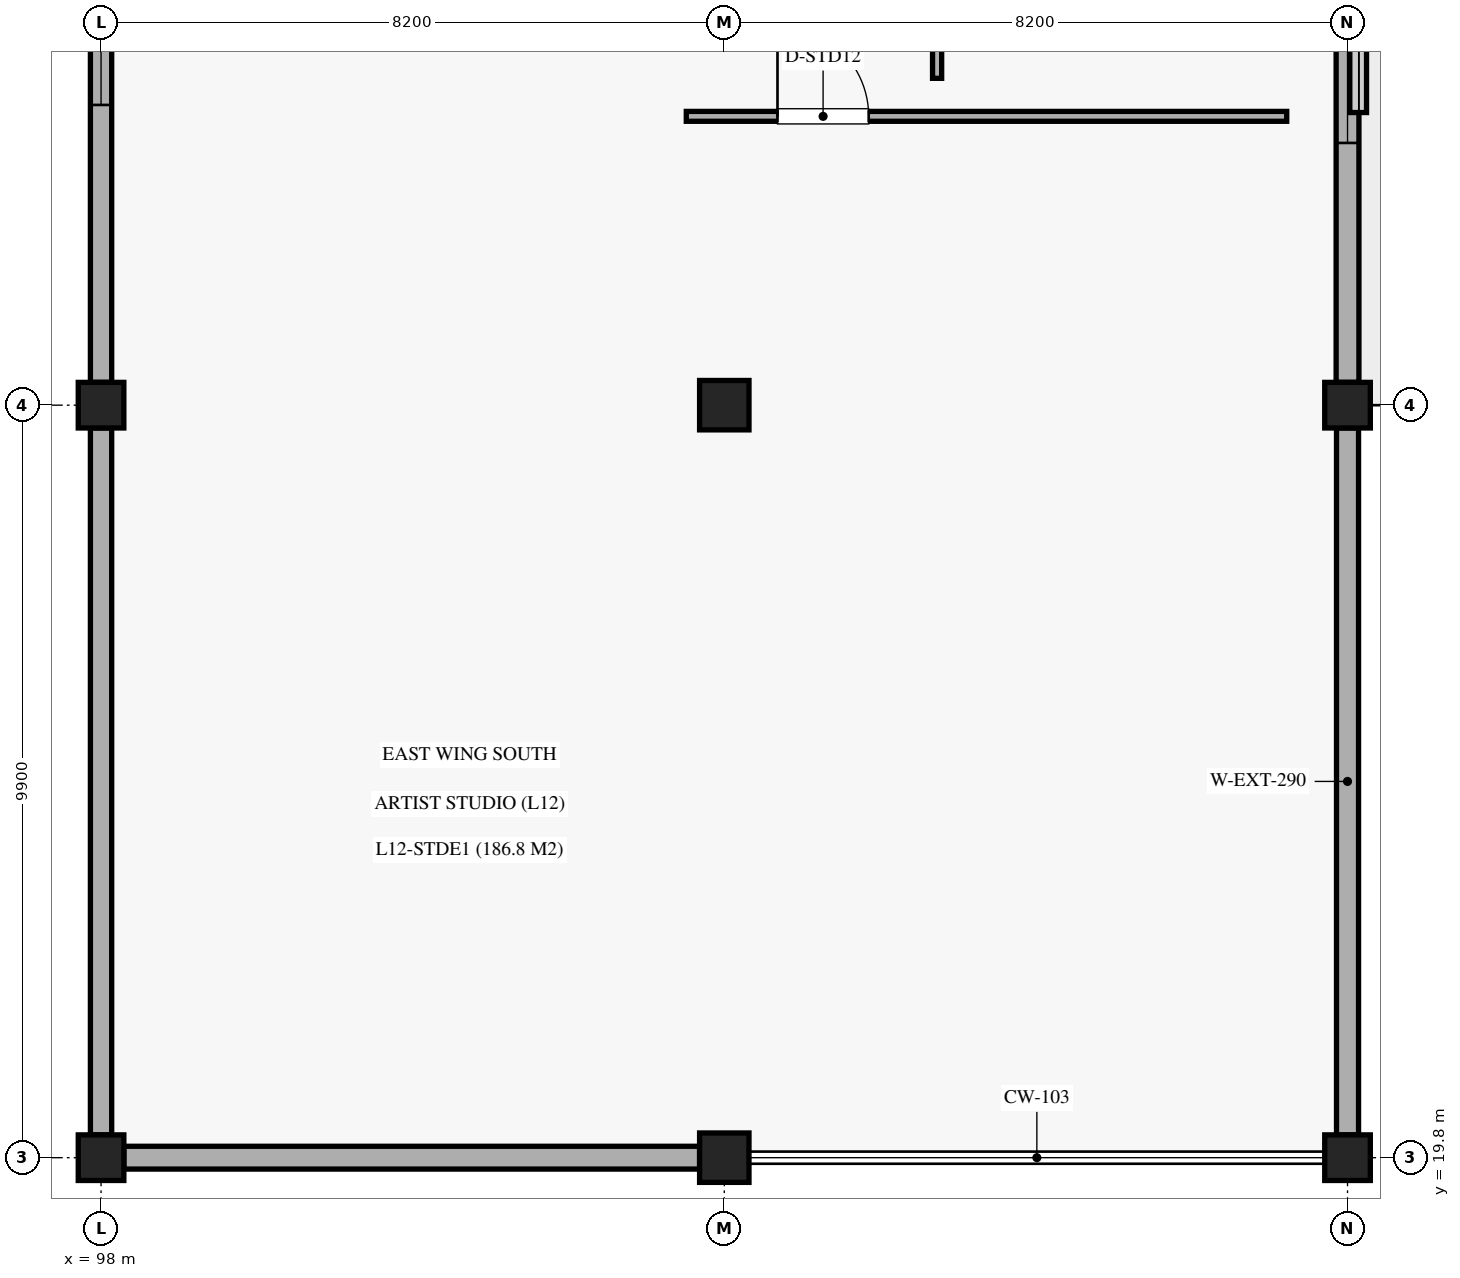
"""IFC4 building model, lengths in metres.
Left out: names, types, materials, properties, quantities, classifications, styles, units other than length and angle.
Written with IfcOpenShell. Run it as: python <this file> out.ifc"""

import sys

from ifc_helpers import new_model, si_unit, direction, frame, frame_2d, origin, origin_2d, place, context, subcontext, project, spatial, rectangle, extrude, element, fill, save


model = new_model("IFC4")
c1 = context("Model", 3, precision=1e-05, world=origin(), true_north=direction((0.0, 1.0)))
c2 = subcontext(c1, "Body", "Model", "MODEL_VIEW")
j1 = project(units=[si_unit("LENGTHUNIT", "METRE"), si_unit("PLANEANGLEUNIT", "RADIAN")], contexts=[c1])
p1 = place(None, origin())
s1 = spatial("IfcSite", under=j1, at=p1, CompositionType="ELEMENT")
p2 = place(p1, origin())
s2 = spatial("IfcBuilding", under=s1, at=p2, CompositionType="ELEMENT")
p3 = place(p2, frame((0.0, 0.0, 62.22)))
s3 = spatial("IfcBuildingStorey", under=s2, at=p3, CompositionType="ELEMENT", Elevation=62.22)
for number, where, z_axis, x_axis in (
    (1, (98.0, 19.8, 0.0), (0.0, 0.0, 1.0), (1.0, 0.0, 0.0)),
    (2, (98.0, 29.7, 0.0), (0.0, 0.0, 1.0), (1.0, 0.0, 0.0)),
):
    element("IfcColumn", number, at=place(p3, frame(where, z_axis=z_axis, x_axis=x_axis)), inside=s3, PredefinedType="COLUMN", context=c2, shape_type="SweptSolid", body=[
        extrude(rectangle(XDim=0.6, YDim=0.6, at=origin_2d()), origin(), (0.0, 0.0, 1.0), 4.08),
    ])
for number, where, z_axis, x_axis in (
    (3, (106.2, 19.8, 0.0), (0.0, 0.0, 1.0), (1.0, 0.0, 0.0)),
    (4, (106.2, 29.7, 0.0), (0.0, 0.0, 1.0), (1.0, 0.0, 0.0)),
):
    element("IfcColumn", number, at=place(p3, frame(where, z_axis=z_axis, x_axis=x_axis)), inside=s3, PredefinedType="COLUMN", context=c2, shape_type="SweptSolid", body=[
        extrude(rectangle(XDim=0.65, YDim=0.65, at=origin_2d()), origin(), (0.0, 0.0, 1.0), 4.08),
    ])
for number, where, z_axis, x_axis in (
    (5, (114.4, 19.8, 0.0), (0.0, 0.0, 1.0), (1.0, 0.0, 0.0)),
    (6, (114.4, 29.7, 0.0), (0.0, 0.0, 1.0), (1.0, 0.0, 0.0)),
):
    element("IfcColumn", number, at=place(p3, frame(where, z_axis=z_axis, x_axis=x_axis)), inside=s3, PredefinedType="COLUMN", context=c2, shape_type="SweptSolid", body=[
        extrude(rectangle(XDim=0.6, YDim=0.6, at=origin_2d()), origin(), (0.0, 0.0, 1.0), 4.08),
    ])
p4 = place(p3, frame((98.0, 20.1, 0.0), z_axis=(0.0, 0.0, 1.0), x_axis=(0.0, 1.0, 0.0)))
e7 = element("IfcWall", 7, at=p4, inside=s3, PredefinedType="SOLIDWALL", context=c2, shape_type="SweptSolid", body=[
    extrude(rectangle(XDim=9.3, YDim=0.28, at=frame_2d((4.65, 0.0))), origin(), (0.0, 0.0, 1.0), 3.1),
])
p5 = place(p3, frame((114.4, 20.1, 0.0), z_axis=(0.0, 0.0, 1.0), x_axis=(0.0, 1.0, 0.0)))
e8 = element("IfcWall", 8, at=p5, inside=s3, PredefinedType="SOLIDWALL", context=c2, shape_type="SweptSolid", body=[
    extrude(rectangle(XDim=9.3, YDim=0.29, at=frame_2d((4.65, 0.0))), origin(), (0.0, 0.0, 1.0), 3.1),
])
p6 = place(p3, frame((98.0, 30.0, 0.0), z_axis=(0.0, 0.0, 1.0), x_axis=(0.0, 1.0, 0.0)))
e9 = element("IfcWall", 9, at=p6, inside=s3, PredefinedType="SOLIDWALL", context=c2, shape_type="SweptSolid", body=[
    extrude(rectangle(XDim=9.3, YDim=0.28, at=frame_2d((4.65, 0.0))), origin(), (0.0, 0.0, 1.0), 3.1),
])
p7 = place(p6, frame((3.65, 0.0, 1.15)))
e10 = element("IfcOpeningElement", 10, at=p7, cuts=e9, PredefinedType="OPENING", context=c2, shape_type="SweptSolid", body=[
    extrude(rectangle(XDim=2.1, YDim=1.5, at=frame_2d((1.05, 0.75))), frame((0.0, 0.15, 0.0), z_axis=(0.0, -1.0, 0.0), x_axis=(1.0, 0.0, 0.0)), (0.0, 0.0, 1.0), 0.3),
])
p8 = place(p3, frame((114.4, 30.0, 0.0), z_axis=(0.0, 0.0, 1.0), x_axis=(0.0, 1.0, 0.0)))
e11 = element("IfcWall", 11, at=p8, inside=s3, PredefinedType="SOLIDWALL", context=c2, shape_type="SweptSolid", body=[
    extrude(rectangle(XDim=9.3, YDim=0.3, at=frame_2d((4.65, 0.0))), origin(), (0.0, 0.0, 1.0), 3.1),
])
p9 = place(p8, frame((3.15, 0.0, 1.15)))
e12 = element("IfcOpeningElement", 12, at=p9, cuts=e11, PredefinedType="OPENING", context=c2, shape_type="SweptSolid", body=[
    extrude(rectangle(XDim=3.0, YDim=1.95, at=frame_2d((1.5, 0.975))), frame((0.0, 0.16, 0.0), z_axis=(0.0, -1.0, 0.0), x_axis=(1.0, 0.0, 0.0)), (0.0, 0.0, 1.0), 0.32),
])
p10 = place(p3, frame((98.3, 19.8, 0.0), z_axis=(0.0, 0.0, 1.0), x_axis=(1.0, 0.0, 0.0)))
e13 = element("IfcWall", 13, at=p10, inside=s3, PredefinedType="SOLIDWALL", context=c2, shape_type="SweptSolid", body=[
    extrude(rectangle(XDim=7.575, YDim=0.3, at=frame_2d((3.788, 0.0))), origin(), (0.0, 0.0, 1.0), 3.1),
])
p11 = place(p3, frame((105.7, 33.5, 0.0), z_axis=(0.0, 0.0, 1.0), x_axis=(1.0, 0.0, 0.0)))
e14 = element("IfcWall", 14, at=p11, inside=s3, PredefinedType="PARTITIONING", context=c2, shape_type="SweptSolid", body=[
    extrude(rectangle(XDim=7.9, YDim=0.13, at=frame_2d((3.95, 0.0))), origin(), (0.0, 0.0, 1.0), 2.97),
])
p12 = place(p11, frame((1.2, 0.0, 0.0)))
e15 = element("IfcOpeningElement", 15, at=p12, cuts=e14, PredefinedType="OPENING", context=c2, shape_type="SweptSolid", body=[
    extrude(rectangle(XDim=1.2, YDim=2.25, at=frame_2d((0.6, 1.125))), frame((0.0, 0.075, 0.0), z_axis=(0.0, -1.0, 0.0), x_axis=(1.0, 0.0, 0.0)), (0.0, 0.0, 1.0), 0.15),
])
p13 = place(p3, frame((109.0, 34.0, 0.0), z_axis=(0.0, 0.0, 1.0), x_axis=(0.0, 1.0, 0.0)))
e16 = element("IfcWall", 16, at=p13, inside=s3, PredefinedType="PARTITIONING", context=c2, shape_type="SweptSolid", body=[
    extrude(rectangle(XDim=30.0, YDim=0.12, at=frame_2d((15.0, 0.0))), origin(), (0.0, 0.0, 1.0), 2.97),
])
p14 = place(p13, frame((8.0, 0.0, 0.0)))
e17 = element("IfcOpeningElement", 17, at=p14, cuts=e16, PredefinedType="OPENING", context=c2, shape_type="SweptSolid", body=[
    extrude(rectangle(XDim=1.2, YDim=2.25, at=frame_2d((0.6, 1.125))), frame((0.0, 0.07, 0.0), z_axis=(0.0, -1.0, 0.0), x_axis=(1.0, 0.0, 0.0)), (0.0, 0.0, 1.0), 0.14),
])
p15 = place(p7, origin())
e18 = element("IfcWindow", 18, at=p15, inside=s3, PartitioningType="SINGLE_PANEL", PredefinedType="WINDOW", context=c2, shape_type="SweptSolid", body=[
    extrude(rectangle(XDim=2.1, YDim=1.5, at=frame_2d((1.05, 0.75))), frame((0.0, 0.03, 0.0), z_axis=(0.0, -1.0, 0.0), x_axis=(1.0, 0.0, 0.0)), (0.0, 0.0, 1.0), 0.06),
])
fill(e10, e18)
p16 = place(p9, origin())
e19 = element("IfcWindow", 19, at=p16, inside=s3, PartitioningType="SINGLE_PANEL", PredefinedType="WINDOW", context=c2, shape_type="SweptSolid", body=[
    extrude(rectangle(XDim=3.0, YDim=1.95, at=frame_2d((1.5, 0.975))), frame((0.0, 0.03, 0.0), z_axis=(0.0, -1.0, 0.0), x_axis=(1.0, 0.0, 0.0)), (0.0, 0.0, 1.0), 0.06),
])
fill(e12, e19)
p17 = place(p12, origin())
e20 = element("IfcDoor", 20, at=p17, inside=s3, OperationType="SINGLE_SWING_LEFT", PredefinedType="DOOR", context=c2, shape_type="SweptSolid", body=[
    extrude(rectangle(XDim=1.2, YDim=2.25, at=frame_2d((0.6, 1.125))), frame((0.0, 0.025, 0.0), z_axis=(0.0, -1.0, 0.0), x_axis=(1.0, 0.0, 0.0)), (0.0, 0.0, 1.0), 0.05),
])
fill(e15, e20)
save(model, sys.argv[1])
